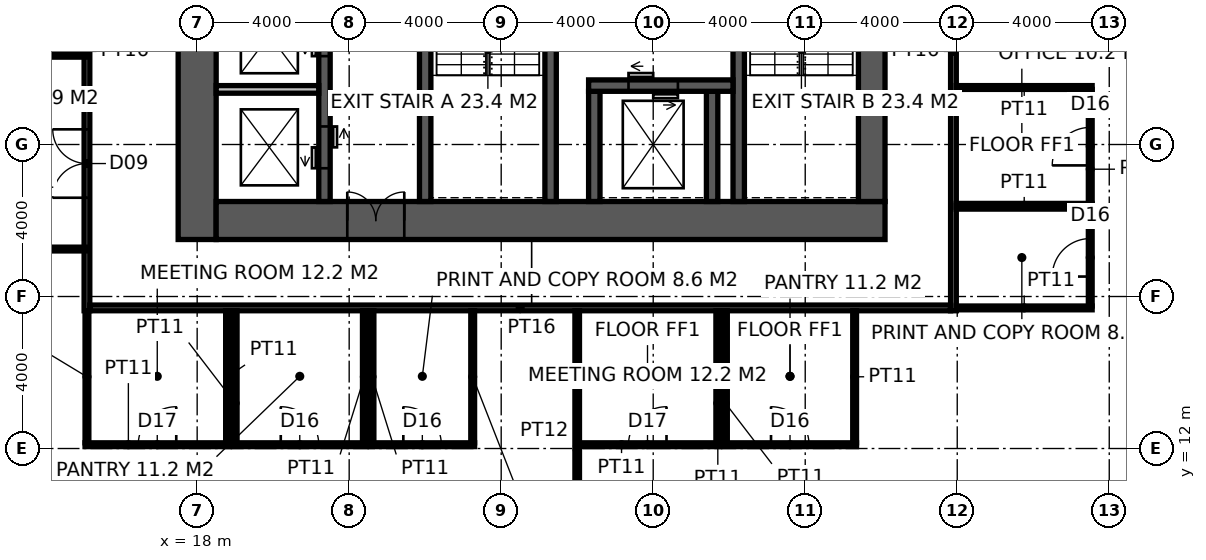
"""IFC4 building model, lengths in metres.
Left out: names, types, materials, properties, quantities, classifications, styles, units other than length and angle.
Written with IfcOpenShell. Run it as: python <this file> out.ifc"""

import sys

from ifc_helpers import new_model, si_unit, direction, frame, frame_2d, origin, place, context, subcontext, project, spatial, rectangle, extrude, element, fill, save


model = new_model("IFC4")
c1 = context("Model", 3, precision=1e-05, world=origin(), true_north=direction((0.0, 1.0)))
c2 = subcontext(c1, "Body", "Model", "MODEL_VIEW")
j1 = project(units=[si_unit("LENGTHUNIT", "METRE"), si_unit("PLANEANGLEUNIT", "RADIAN")], contexts=[c1])
p1 = place(None, origin())
s1 = spatial("IfcSite", under=j1, at=p1, CompositionType="ELEMENT")
p2 = place(p1, origin())
s2 = spatial("IfcBuilding", under=s1, at=p2, CompositionType="ELEMENT")
p3 = place(p2, frame((0.0, 0.0, 179.8)))
s3 = spatial("IfcBuildingStorey", under=s2, at=p3, CompositionType="ELEMENT", Elevation=179.8)
p4 = place(p3, frame((18.0, 17.5, -0.15), z_axis=(0.0, 0.0, 1.0), x_axis=(0.0, 1.0, 0.0)))
e1 = element("IfcWall", 1, at=p4, inside=s3, PredefinedType="SHEAR", context=c2, shape_type="SweptSolid", body=[
    extrude(rectangle(XDim=19.0, YDim=1.0, at=frame_2d((9.5, 0.0))), origin(), (0.0, 0.0, 1.0), 4.0),
])
p5 = place(p3, frame((18.5, 18.0, -0.15), z_axis=(0.0, 0.0, 1.0), x_axis=(1.0, 0.0, 0.0)))
e2 = element("IfcWall", 2, at=p5, inside=s3, PredefinedType="SHEAR", context=c2, shape_type="SweptSolid", body=[
    extrude(rectangle(XDim=17.6, YDim=1.0, at=frame_2d((8.8, 0.0))), origin(), (0.0, 0.0, 1.0), 4.0),
])
p6 = place(p5, frame((3.45, 0.0, 0.15)))
e3 = element("IfcOpeningElement", 3, at=p6, cuts=e2, PredefinedType="OPENING", context=c2, shape_type="SweptSolid", body=[
    extrude(rectangle(XDim=1.5, YDim=2.4, at=frame_2d((0.75, 1.2))), frame((0.0, 0.51, 0.0), z_axis=(0.0, -1.0, 0.0), x_axis=(1.0, 0.0, 0.0)), (0.0, 0.0, 1.0), 1.02),
])
p7 = place(p3, frame((35.75, 18.5, -0.15), z_axis=(0.0, 0.0, 1.0), x_axis=(0.0, 1.0, 0.0)))
e4 = element("IfcWall", 4, at=p7, inside=s3, PredefinedType="SHEAR", context=c2, shape_type="SweptSolid", body=[
    extrude(rectangle(XDim=17.0, YDim=0.7, at=frame_2d((8.5, 0.0))), origin(), (0.0, 0.0, 1.0), 4.0),
])
p8 = place(p7, frame((9.85, 0.0, 0.15)))
e5 = element("IfcOpeningElement", 5, at=p8, cuts=e4, PredefinedType="OPENING", context=c2, shape_type="SweptSolid", body=[
    extrude(rectangle(XDim=1.0, YDim=2.2, at=frame_2d((0.5, 1.1))), frame((0.0, 0.36, 0.0), z_axis=(0.0, -1.0, 0.0), x_axis=(1.0, 0.0, 0.0)), (0.0, 0.0, 1.0), 0.72),
])
p9 = place(p3, frame((24.0, 18.5, -0.15), z_axis=(0.0, 0.0, 1.0), x_axis=(0.0, 1.0, 0.0)))
e6 = element("IfcWall", 6, at=p9, inside=s3, PredefinedType="SHEAR", context=c2, shape_type="SweptSolid", body=[
    extrude(rectangle(XDim=17.0, YDim=0.3, at=frame_2d((8.5, 0.0))), origin(), (0.0, 0.0, 1.0), 4.0),
])
p10 = place(p9, frame((9.6, 0.0, 0.15)))
e7 = element("IfcOpeningElement", 7, at=p10, cuts=e6, PredefinedType="OPENING", context=c2, shape_type="SweptSolid", body=[
    extrude(rectangle(XDim=1.5, YDim=2.4, at=frame_2d((0.75, 1.2))), frame((0.0, 0.16, 0.0), z_axis=(0.0, -1.0, 0.0), x_axis=(1.0, 0.0, 0.0)), (0.0, 0.0, 1.0), 0.32),
])
p11 = place(p3, frame((27.3, 18.5, -0.15), z_axis=(0.0, 0.0, 1.0), x_axis=(0.0, 1.0, 0.0)))
e8 = element("IfcWall", 8, at=p11, inside=s3, PredefinedType="SHEAR", context=c2, shape_type="SweptSolid", body=[
    extrude(rectangle(XDim=7.9, YDim=0.3, at=frame_2d((3.95, 0.0))), origin(), (0.0, 0.0, 1.0), 4.0),
])
p12 = place(p11, frame((6.4, 0.0, 0.15)))
e9 = element("IfcOpeningElement", 9, at=p12, cuts=e8, PredefinedType="OPENING", context=c2, shape_type="SweptSolid", body=[
    extrude(rectangle(XDim=1.0, YDim=2.2, at=frame_2d((0.5, 1.1))), frame((0.0, 0.16, 0.0), z_axis=(0.0, -1.0, 0.0), x_axis=(1.0, 0.0, 0.0)), (0.0, 0.0, 1.0), 0.32),
])
p13 = place(p3, frame((32.25, 18.5, -0.15), z_axis=(0.0, 0.0, 1.0), x_axis=(0.0, 1.0, 0.0)))
e10 = element("IfcWall", 10, at=p13, inside=s3, PredefinedType="SHEAR", context=c2, shape_type="SweptSolid", body=[
    extrude(rectangle(XDim=7.9, YDim=0.3, at=frame_2d((3.95, 0.0))), origin(), (0.0, 0.0, 1.0), 4.0),
])
for number, where, z_axis, x_axis in (
    (11, (28.45, 18.5, -0.15), (0.0, 0.0, 1.0), (0.0, 1.0, 0.0)),
    (12, (31.55, 18.5, -0.15), (0.0, 0.0, 1.0), (0.0, 1.0, 0.0)),
):
    element("IfcWall", number, at=place(p3, frame(where, z_axis=z_axis, x_axis=x_axis)), inside=s3, PredefinedType="SHEAR", context=c2, shape_type="SweptSolid", body=[
        extrude(rectangle(XDim=2.9, YDim=0.3, at=frame_2d((1.45, 0.0))), origin(), (0.0, 0.0, 1.0), 4.0),
    ])
p14 = place(p3, frame((28.3, 21.55, -0.15), z_axis=(0.0, 0.0, 1.0), x_axis=(1.0, 0.0, 0.0)))
e13 = element("IfcWall", 13, at=p14, inside=s3, PredefinedType="SHEAR", context=c2, shape_type="SweptSolid", body=[
    extrude(rectangle(XDim=3.8, YDim=0.3, at=frame_2d((1.9, 0.0))), origin(), (0.0, 0.0, 1.0), 4.0),
])
p15 = place(p14, frame((1.05, 0.0, 0.15)))
e14 = element("IfcOpeningElement", 14, at=p15, cuts=e13, PredefinedType="OPENING", context=c2, shape_type="SweptSolid", body=[
    extrude(rectangle(XDim=1.3, YDim=2.4, at=frame_2d((0.65, 1.2))), frame((0.0, 0.16, 0.0), z_axis=(0.0, -1.0, 0.0), x_axis=(1.0, 0.0, 0.0)), (0.0, 0.0, 1.0), 0.32),
])
p16 = place(p3, frame((21.35, 18.5, -0.15), z_axis=(0.0, 0.0, 1.0), x_axis=(0.0, 1.0, 0.0)))
e15 = element("IfcWall", 15, at=p16, inside=s3, PredefinedType="SHEAR", context=c2, shape_type="SweptSolid", body=[
    extrude(rectangle(XDim=12.5, YDim=0.3, at=frame_2d((6.25, 0.0))), origin(), (0.0, 0.0, 1.0), 4.0),
])
p17 = place(p16, frame((0.875, 0.0, 0.15)))
e16 = element("IfcOpeningElement", 16, at=p17, cuts=e15, PredefinedType="OPENING", context=c2, shape_type="SweptSolid", body=[
    extrude(rectangle(XDim=1.1, YDim=2.2, at=frame_2d((0.55, 1.1))), frame((0.0, 0.16, 0.0), z_axis=(0.0, -1.0, 0.0), x_axis=(1.0, 0.0, 0.0)), (0.0, 0.0, 1.0), 0.32),
])
p18 = place(p16, frame((3.825, 0.0, 0.15)))
e17 = element("IfcOpeningElement", 17, at=p18, cuts=e15, PredefinedType="OPENING", context=c2, shape_type="SweptSolid", body=[
    extrude(rectangle(XDim=1.1, YDim=2.2, at=frame_2d((0.55, 1.1))), frame((0.0, 0.16, 0.0), z_axis=(0.0, -1.0, 0.0), x_axis=(1.0, 0.0, 0.0)), (0.0, 0.0, 1.0), 0.32),
])
p19 = place(p16, frame((6.675, 0.0, 0.15)))
e18 = element("IfcOpeningElement", 18, at=p19, cuts=e15, PredefinedType="OPENING", context=c2, shape_type="SweptSolid", body=[
    extrude(rectangle(XDim=1.1, YDim=2.2, at=frame_2d((0.55, 1.1))), frame((0.0, 0.16, 0.0), z_axis=(0.0, -1.0, 0.0), x_axis=(1.0, 0.0, 0.0)), (0.0, 0.0, 1.0), 0.32),
])
p20 = place(p16, frame((9.575, 0.0, 0.15)))
e19 = element("IfcOpeningElement", 19, at=p20, cuts=e15, PredefinedType="OPENING", context=c2, shape_type="SweptSolid", body=[
    extrude(rectangle(XDim=1.1, YDim=2.2, at=frame_2d((0.55, 1.1))), frame((0.0, 0.16, 0.0), z_axis=(0.0, -1.0, 0.0), x_axis=(1.0, 0.0, 0.0)), (0.0, 0.0, 1.0), 0.32),
])
p21 = place(p3, frame((18.5, 21.45, -0.15), z_axis=(0.0, 0.0, 1.0), x_axis=(1.0, 0.0, 0.0)))
e20 = element("IfcWall", 20, at=p21, inside=s3, PredefinedType="SOLIDWALL", context=c2, shape_type="SweptSolid", body=[
    extrude(rectangle(XDim=2.7, YDim=0.2, at=frame_2d((1.35, 0.0))), origin(), (0.0, 0.0, 1.0), 4.0),
])
p22 = place(p3, frame((15.1, 15.625, 0.0), z_axis=(0.0, 0.0, 1.0), x_axis=(0.0, 1.0, 0.0)))
e21 = element("IfcWall", 21, at=p22, inside=s3, PredefinedType="PARTITIONING", context=c2, shape_type="SweptSolid", body=[
    extrude(rectangle(XDim=22.75, YDim=0.15, at=frame_2d((11.375, 0.0))), origin(), (0.0, 0.0, 1.0), 3.85),
])
p23 = place(p22, frame((2.974, 0.0, 0.0)))
e22 = element("IfcOpeningElement", 22, at=p23, cuts=e21, PredefinedType="OPENING", context=c2, shape_type="SweptSolid", body=[
    extrude(rectangle(XDim=1.8, YDim=2.4, at=frame_2d((0.9, 1.2))), frame((0.0, 0.085, 0.0), z_axis=(0.0, -1.0, 0.0), x_axis=(1.0, 0.0, 0.0)), (0.0, 0.0, 1.0), 0.17),
])
p24 = place(p22, frame((14.225, 0.0, 0.0)))
e23 = element("IfcOpeningElement", 23, at=p24, cuts=e21, PredefinedType="OPENING", context=c2, shape_type="SweptSolid", body=[
    extrude(rectangle(XDim=1.8, YDim=2.4, at=frame_2d((0.9, 1.2))), frame((0.0, 0.085, 0.0), z_axis=(0.0, -1.0, 0.0), x_axis=(1.0, 0.0, 0.0)), (0.0, 0.0, 1.0), 0.17),
])
p25 = place(p3, frame((37.9, 15.625, 0.0), z_axis=(0.0, 0.0, 1.0), x_axis=(0.0, 1.0, 0.0)))
e24 = element("IfcWall", 24, at=p25, inside=s3, PredefinedType="PARTITIONING", context=c2, shape_type="SweptSolid", body=[
    extrude(rectangle(XDim=22.75, YDim=0.15, at=frame_2d((11.375, 0.0))), origin(), (0.0, 0.0, 1.0), 2.95),
])
p26 = place(p25, frame((10.475, 0.0, 0.0)))
e25 = element("IfcOpeningElement", 25, at=p26, cuts=e24, PredefinedType="OPENING", context=c2, shape_type="SweptSolid", body=[
    extrude(rectangle(XDim=1.8, YDim=2.4, at=frame_2d((0.9, 1.2))), frame((0.0, 0.085, 0.0), z_axis=(0.0, -1.0, 0.0), x_axis=(1.0, 0.0, 0.0)), (0.0, 0.0, 1.0), 0.17),
])
p27 = place(p3, frame((15.175, 15.7, 0.0), z_axis=(0.0, 0.0, 1.0), x_axis=(1.0, 0.0, 0.0)))
e26 = element("IfcWall", 26, at=p27, inside=s3, PredefinedType="PARTITIONING", context=c2, shape_type="SweptSolid", body=[
    extrude(rectangle(XDim=22.65, YDim=0.15, at=frame_2d((11.325, 0.0))), origin(), (0.0, 0.0, 1.0), 3.85),
])
p28 = place(p3, frame((28.0, 8.3, 0.0), z_axis=(0.0, 0.0, 1.0), x_axis=(0.0, 1.0, 0.0)))
e27 = element("IfcWall", 27, at=p28, inside=s3, PredefinedType="PARTITIONING", context=c2, shape_type="SweptSolid", body=[
    extrude(rectangle(XDim=7.325, YDim=0.12, at=frame_2d((3.663, 0.0))), origin(), (0.0, 0.0, 1.0), 3.85),
])
p29 = place(p3, frame((15.05, 12.1, 0.0), z_axis=(0.0, 0.0, 1.0), x_axis=(1.0, 0.0, 0.0)))
e28 = element("IfcWall", 28, at=p29, inside=s3, PredefinedType="PARTITIONING", context=c2, shape_type="SweptSolid", body=[
    extrude(rectangle(XDim=3.8, YDim=0.1, at=frame_2d((1.9, 0.0))), origin(), (0.0, 0.0, 1.0), 3.85),
])
p30 = place(p29, frame((1.4, 0.0, 0.0)))
e29 = element("IfcOpeningElement", 29, at=p30, cuts=e28, PredefinedType="OPENING", context=c2, shape_type="SweptSolid", body=[
    extrude(rectangle(XDim=1.0, YDim=2.2, at=frame_2d((0.5, 1.1))), frame((0.0, 0.06, 0.0), z_axis=(0.0, -1.0, 0.0), x_axis=(1.0, 0.0, 0.0)), (0.0, 0.0, 1.0), 0.12),
])
p31 = place(p3, frame((18.95, 12.1, 0.0), z_axis=(0.0, 0.0, 1.0), x_axis=(1.0, 0.0, 0.0)))
e30 = element("IfcWall", 30, at=p31, inside=s3, PredefinedType="PARTITIONING", context=c2, shape_type="SweptSolid", body=[
    extrude(rectangle(XDim=3.5, YDim=0.1, at=frame_2d((1.75, 0.0))), origin(), (0.0, 0.0, 1.0), 3.85),
])
p32 = place(p31, frame((1.25, 0.0, 0.0)))
e31 = element("IfcOpeningElement", 31, at=p32, cuts=e30, PredefinedType="OPENING", context=c2, shape_type="SweptSolid", body=[
    extrude(rectangle(XDim=1.0, YDim=2.2, at=frame_2d((0.5, 1.1))), frame((0.0, 0.06, 0.0), z_axis=(0.0, -1.0, 0.0), x_axis=(1.0, 0.0, 0.0)), (0.0, 0.0, 1.0), 0.12),
])
p33 = place(p3, frame((22.55, 12.1, 0.0), z_axis=(0.0, 0.0, 1.0), x_axis=(1.0, 0.0, 0.0)))
e32 = element("IfcWall", 32, at=p33, inside=s3, PredefinedType="PARTITIONING", context=c2, shape_type="SweptSolid", body=[
    extrude(rectangle(XDim=2.75, YDim=0.1, at=frame_2d((1.375, 0.0))), origin(), (0.0, 0.0, 1.0), 3.85),
])
p34 = place(p33, frame((0.875, 0.0, 0.0)))
e33 = element("IfcOpeningElement", 33, at=p34, cuts=e32, PredefinedType="OPENING", context=c2, shape_type="SweptSolid", body=[
    extrude(rectangle(XDim=1.0, YDim=2.2, at=frame_2d((0.5, 1.1))), frame((0.0, 0.06, 0.0), z_axis=(0.0, -1.0, 0.0), x_axis=(1.0, 0.0, 0.0)), (0.0, 0.0, 1.0), 0.12),
])
p35 = place(p3, frame((28.06, 12.1, 0.0), z_axis=(0.0, 0.0, 1.0), x_axis=(1.0, 0.0, 0.0)))
e34 = element("IfcWall", 34, at=p35, inside=s3, PredefinedType="PARTITIONING", context=c2, shape_type="SweptSolid", body=[
    extrude(rectangle(XDim=3.69, YDim=0.1, at=frame_2d((1.845, 0.0))), origin(), (0.0, 0.0, 1.0), 3.85),
])
p36 = place(p35, frame((1.29, 0.0, 0.0)))
e35 = element("IfcOpeningElement", 35, at=p36, cuts=e34, PredefinedType="OPENING", context=c2, shape_type="SweptSolid", body=[
    extrude(rectangle(XDim=1.0, YDim=2.2, at=frame_2d((0.5, 1.1))), frame((0.0, 0.06, 0.0), z_axis=(0.0, -1.0, 0.0), x_axis=(1.0, 0.0, 0.0)), (0.0, 0.0, 1.0), 0.12),
])
p37 = place(p3, frame((31.85, 12.1, 0.0), z_axis=(0.0, 0.0, 1.0), x_axis=(1.0, 0.0, 0.0)))
e36 = element("IfcWall", 36, at=p37, inside=s3, PredefinedType="PARTITIONING", context=c2, shape_type="SweptSolid", body=[
    extrude(rectangle(XDim=3.5, YDim=0.1, at=frame_2d((1.75, 0.0))), origin(), (0.0, 0.0, 1.0), 3.85),
])
p38 = place(p37, frame((1.25, 0.0, 0.0)))
e37 = element("IfcOpeningElement", 37, at=p38, cuts=e36, PredefinedType="OPENING", context=c2, shape_type="SweptSolid", body=[
    extrude(rectangle(XDim=1.0, YDim=2.2, at=frame_2d((0.5, 1.1))), frame((0.0, 0.06, 0.0), z_axis=(0.0, -1.0, 0.0), x_axis=(1.0, 0.0, 0.0)), (0.0, 0.0, 1.0), 0.12),
])
for number, where, z_axis, x_axis in (
    (38, (37.975, 15.7, 0.0), (0.0, 0.0, 1.0), (1.0, 0.0, 0.0)),
    (39, (37.975, 18.35, 0.0), (0.0, 0.0, 1.0), (1.0, 0.0, 0.0)),
    (40, (37.975, 18.4, 0.0), (0.0, 0.0, 1.0), (1.0, 0.0, 0.0)),
    (41, (37.975, 21.5, 0.0), (0.0, 0.0, 1.0), (1.0, 0.0, 0.0)),
):
    element("IfcWall", number, at=place(p3, frame(where, z_axis=z_axis, x_axis=x_axis)), inside=s3, PredefinedType="PARTITIONING", context=c2, shape_type="SweptSolid", body=[
        extrude(rectangle(XDim=3.575, YDim=0.1, at=frame_2d((1.788, 0.0))), origin(), (0.0, 0.0, 1.0), 3.85),
    ])
for number, where, z_axis, x_axis in (
    (42, (15.1, 12.15, 0.0), (0.0, 0.0, 1.0), (0.0, 1.0, 0.0)),
    (43, (18.8, 12.15, 0.0), (0.0, 0.0, 1.0), (0.0, 1.0, 0.0)),
    (44, (19.0, 12.15, 0.0), (0.0, 0.0, 1.0), (0.0, 1.0, 0.0)),
    (45, (22.4, 12.15, 0.0), (0.0, 0.0, 1.0), (0.0, 1.0, 0.0)),
    (46, (22.6, 12.15, 0.0), (0.0, 0.0, 1.0), (0.0, 1.0, 0.0)),
    (47, (25.25, 12.15, 0.0), (0.0, 0.0, 1.0), (0.0, 1.0, 0.0)),
    (48, (31.7, 12.15, 0.0), (0.0, 0.0, 1.0), (0.0, 1.0, 0.0)),
    (49, (31.9, 12.15, 0.0), (0.0, 0.0, 1.0), (0.0, 1.0, 0.0)),
    (50, (35.3, 12.15, 0.0), (0.0, 0.0, 1.0), (0.0, 1.0, 0.0)),
):
    element("IfcWall", number, at=place(p3, frame(where, z_axis=z_axis, x_axis=x_axis)), inside=s3, PredefinedType="PARTITIONING", context=c2, shape_type="SweptSolid", body=[
        extrude(rectangle(XDim=3.475, YDim=0.1, at=frame_2d((1.738, 0.0))), origin(), (0.0, 0.0, 1.0), 3.85),
    ])
p39 = place(p3, frame((41.5, 15.75, 0.0), z_axis=(0.0, 0.0, 1.0), x_axis=(0.0, 1.0, 0.0)))
e51 = element("IfcWall", 51, at=p39, inside=s3, PredefinedType="PARTITIONING", context=c2, shape_type="SweptSolid", body=[
    extrude(rectangle(XDim=2.55, YDim=0.1, at=frame_2d((1.275, 0.0))), origin(), (0.0, 0.0, 1.0), 3.85),
])
p40 = place(p39, frame((0.775, 0.0, 0.0)))
e52 = element("IfcOpeningElement", 52, at=p40, cuts=e51, PredefinedType="OPENING", context=c2, shape_type="SweptSolid", body=[
    extrude(rectangle(XDim=1.0, YDim=2.2, at=frame_2d((0.5, 1.1))), frame((0.0, 0.06, 0.0), z_axis=(0.0, -1.0, 0.0), x_axis=(1.0, 0.0, 0.0)), (0.0, 0.0, 1.0), 0.12),
])
p41 = place(p3, frame((41.5, 18.45, 0.0), z_axis=(0.0, 0.0, 1.0), x_axis=(0.0, 1.0, 0.0)))
e53 = element("IfcWall", 53, at=p41, inside=s3, PredefinedType="PARTITIONING", context=c2, shape_type="SweptSolid", body=[
    extrude(rectangle(XDim=3.0, YDim=0.1, at=frame_2d((1.5, 0.0))), origin(), (0.0, 0.0, 1.0), 3.85),
])
p42 = place(p41, frame((1.0, 0.0, 0.0)))
e54 = element("IfcOpeningElement", 54, at=p42, cuts=e53, PredefinedType="OPENING", context=c2, shape_type="SweptSolid", body=[
    extrude(rectangle(XDim=1.0, YDim=2.2, at=frame_2d((0.5, 1.1))), frame((0.0, 0.06, 0.0), z_axis=(0.0, -1.0, 0.0), x_axis=(1.0, 0.0, 0.0)), (0.0, 0.0, 1.0), 0.12),
])
for number, where, z_axis, x_axis in (
    (55, (15.1, 22.349, 0.0), (0.0, 0.0, 1.0), (-1.0, 0.0, 0.0)),
    (56, (10.6, 17.249, 0.0), (0.0, 0.0, 1.0), (1.0, 0.0, 0.0)),
):
    element("IfcWall", number, at=place(p3, frame(where, z_axis=z_axis, x_axis=x_axis)), inside=s3, PredefinedType="PARTITIONING", context=c2, shape_type="SweptSolid", body=[
        extrude(rectangle(XDim=4.5, YDim=0.1, at=frame_2d((2.25, 0.0))), origin(), (0.0, 0.0, 1.0), 3.85),
    ])
p43 = place(p6, origin())
e57 = element("IfcDoor", 57, at=p43, inside=s3, OperationType="DOUBLE_DOOR_DOUBLE_SWING", PredefinedType="DOOR", context=c2, shape_type="SweptSolid", body=[
    extrude(rectangle(XDim=1.5, YDim=2.4, at=frame_2d((0.75, 1.2))), frame((0.0, 0.025, 0.0), z_axis=(0.0, -1.0, 0.0), x_axis=(1.0, 0.0, 0.0)), (0.0, 0.0, 1.0), 0.05),
])
fill(e3, e57)
p44 = place(p23, origin())
e58 = element("IfcDoor", 58, at=p44, inside=s3, OperationType="DOUBLE_DOOR_DOUBLE_SWING", PredefinedType="DOOR", context=c2, shape_type="SweptSolid", body=[
    extrude(rectangle(XDim=1.8, YDim=2.4, at=frame_2d((0.9, 1.2))), frame((0.0, 0.025, 0.0), z_axis=(0.0, -1.0, 0.0), x_axis=(1.0, 0.0, 0.0)), (0.0, 0.0, 1.0), 0.05),
])
fill(e22, e58)
p45 = place(p30, origin())
e59 = element("IfcDoor", 59, at=p45, inside=s3, OperationType="SINGLE_SWING_RIGHT", PredefinedType="DOOR", context=c2, shape_type="SweptSolid", body=[
    extrude(rectangle(XDim=1.0, YDim=2.2, at=frame_2d((0.5, 1.1))), frame((0.0, 0.025, 0.0), z_axis=(0.0, -1.0, 0.0), x_axis=(1.0, 0.0, 0.0)), (0.0, 0.0, 1.0), 0.05),
])
fill(e29, e59)
p46 = place(p32, origin())
e60 = element("IfcDoor", 60, at=p46, inside=s3, OperationType="SINGLE_SWING_LEFT", PredefinedType="DOOR", context=c2, shape_type="SweptSolid", body=[
    extrude(rectangle(XDim=1.0, YDim=2.2, at=frame_2d((0.5, 1.1))), frame((0.0, 0.025, 0.0), z_axis=(0.0, -1.0, 0.0), x_axis=(1.0, 0.0, 0.0)), (0.0, 0.0, 1.0), 0.05),
])
fill(e31, e60)
p47 = place(p34, origin())
e61 = element("IfcDoor", 61, at=p47, inside=s3, OperationType="SINGLE_SWING_LEFT", PredefinedType="DOOR", context=c2, shape_type="SweptSolid", body=[
    extrude(rectangle(XDim=1.0, YDim=2.2, at=frame_2d((0.5, 1.1))), frame((0.0, 0.025, 0.0), z_axis=(0.0, -1.0, 0.0), x_axis=(1.0, 0.0, 0.0)), (0.0, 0.0, 1.0), 0.05),
])
fill(e33, e61)
p48 = place(p36, origin())
e62 = element("IfcDoor", 62, at=p48, inside=s3, OperationType="SINGLE_SWING_RIGHT", PredefinedType="DOOR", context=c2, shape_type="SweptSolid", body=[
    extrude(rectangle(XDim=1.0, YDim=2.2, at=frame_2d((0.5, 1.1))), frame((0.0, 0.025, 0.0), z_axis=(0.0, -1.0, 0.0), x_axis=(1.0, 0.0, 0.0)), (0.0, 0.0, 1.0), 0.05),
])
fill(e35, e62)
p49 = place(p38, origin())
e63 = element("IfcDoor", 63, at=p49, inside=s3, OperationType="SINGLE_SWING_LEFT", PredefinedType="DOOR", context=c2, shape_type="SweptSolid", body=[
    extrude(rectangle(XDim=1.0, YDim=2.2, at=frame_2d((0.5, 1.1))), frame((0.0, 0.025, 0.0), z_axis=(0.0, -1.0, 0.0), x_axis=(1.0, 0.0, 0.0)), (0.0, 0.0, 1.0), 0.05),
])
fill(e37, e63)
p50 = place(p40, origin())
e64 = element("IfcDoor", 64, at=p50, inside=s3, OperationType="SINGLE_SWING_LEFT", PredefinedType="DOOR", context=c2, shape_type="SweptSolid", body=[
    extrude(rectangle(XDim=1.0, YDim=2.2, at=frame_2d((0.5, 1.1))), frame((0.0, 0.025, 0.0), z_axis=(0.0, -1.0, 0.0), x_axis=(1.0, 0.0, 0.0)), (0.0, 0.0, 1.0), 0.05),
])
fill(e52, e64)
p51 = place(p42, origin())
e65 = element("IfcDoor", 65, at=p51, inside=s3, OperationType="SINGLE_SWING_LEFT", PredefinedType="DOOR", context=c2, shape_type="SweptSolid", body=[
    extrude(rectangle(XDim=1.0, YDim=2.2, at=frame_2d((0.5, 1.1))), frame((0.0, 0.025, 0.0), z_axis=(0.0, -1.0, 0.0), x_axis=(1.0, 0.0, 0.0)), (0.0, 0.0, 1.0), 0.05),
])
fill(e54, e65)
p52 = place(p15, origin())
e66 = element("IfcDoor", 66, at=p52, inside=s3, OperationType="DOUBLE_DOOR_SLIDING", PredefinedType="DOOR", context=c2, shape_type="SweptSolid", body=[
    extrude(rectangle(XDim=1.3, YDim=2.4, at=frame_2d((0.65, 1.2))), frame((0.0, 0.025, 0.0), z_axis=(0.0, -1.0, 0.0), x_axis=(1.0, 0.0, 0.0)), (0.0, 0.0, 1.0), 0.05),
])
fill(e14, e66)
p53 = place(p17, origin())
e67 = element("IfcDoor", 67, at=p53, inside=s3, OperationType="DOUBLE_DOOR_SLIDING", PredefinedType="DOOR", context=c2, shape_type="SweptSolid", body=[
    extrude(rectangle(XDim=1.1, YDim=2.2, at=frame_2d((0.55, 1.1))), frame((0.0, 0.025, 0.0), z_axis=(0.0, -1.0, 0.0), x_axis=(1.0, 0.0, 0.0)), (0.0, 0.0, 1.0), 0.05),
])
fill(e16, e67)
p54 = place(p18, origin())
e68 = element("IfcDoor", 68, at=p54, inside=s3, OperationType="DOUBLE_DOOR_SLIDING", PredefinedType="DOOR", context=c2, shape_type="SweptSolid", body=[
    extrude(rectangle(XDim=1.1, YDim=2.2, at=frame_2d((0.55, 1.1))), frame((0.0, 0.025, 0.0), z_axis=(0.0, -1.0, 0.0), x_axis=(1.0, 0.0, 0.0)), (0.0, 0.0, 1.0), 0.05),
])
fill(e17, e68)
save(model, sys.argv[1])
